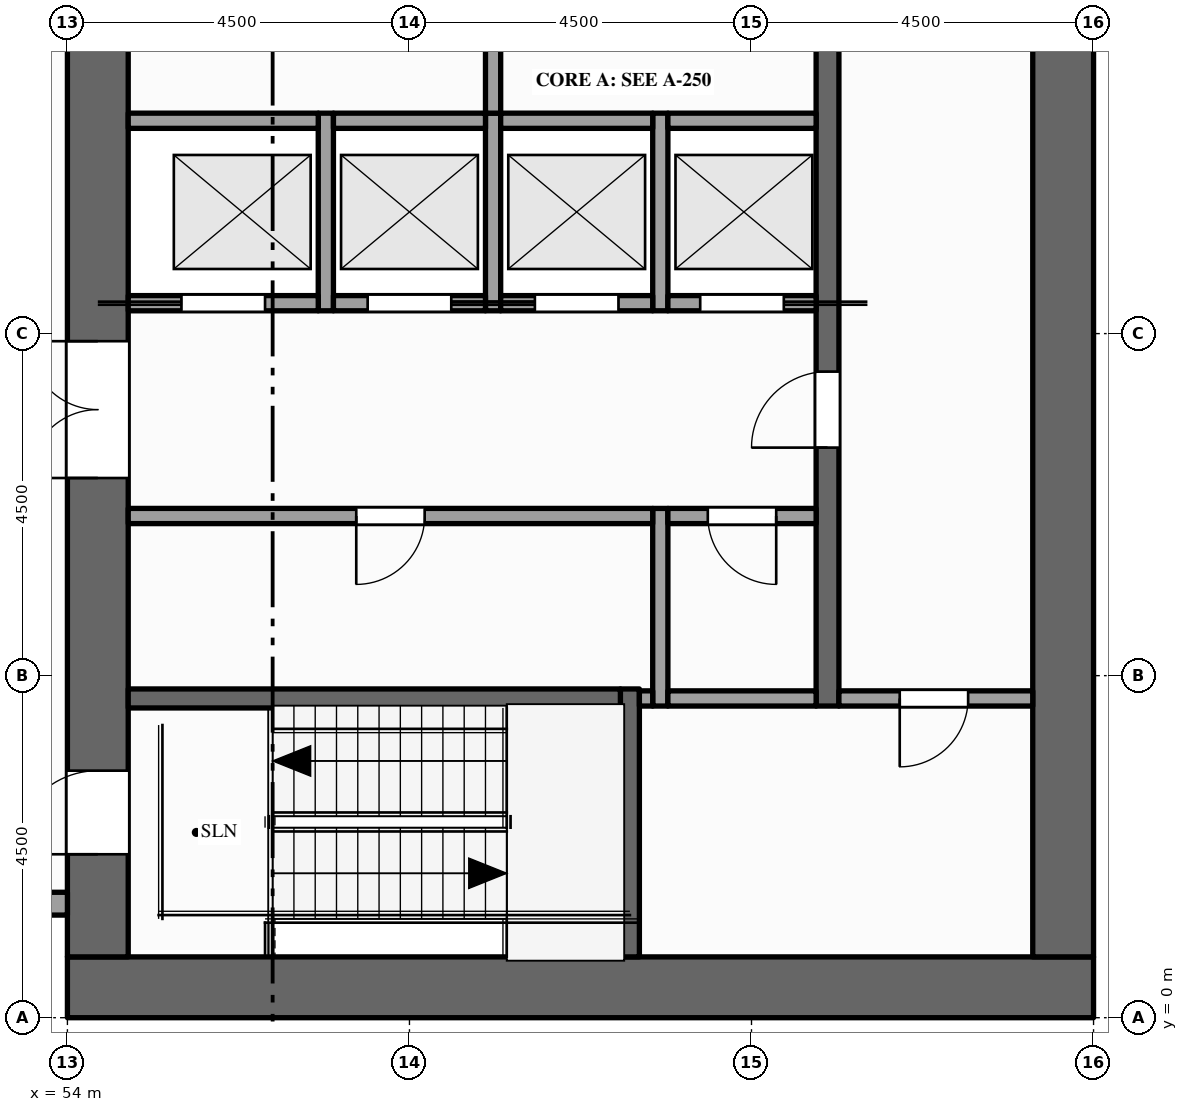
"""IFC4 building model, lengths in metres.
Left out: names, types, materials, properties, quantities, classifications, styles, units other than length and angle.
Written with IfcOpenShell. Run it as: python <this file> out.ifc"""

import sys

from ifc_helpers import new_model, si_unit, direction, frame, frame_2d, origin, place, context, subcontext, project, spatial, rectangle, extrude, element, fill, save


model = new_model("IFC4")
c1 = context("Model", 3, precision=1e-05, world=origin(), true_north=direction((0.0, 1.0)))
c2 = subcontext(c1, "Body", "Model", "MODEL_VIEW")
j1 = project(units=[si_unit("LENGTHUNIT", "METRE"), si_unit("PLANEANGLEUNIT", "RADIAN")], contexts=[c1])
p1 = place(None, origin())
s1 = spatial("IfcSite", under=j1, at=p1, CompositionType="ELEMENT")
p2 = place(p1, origin())
s2 = spatial("IfcBuilding", under=s1, at=p2, CompositionType="ELEMENT")
p3 = place(p2, frame((0.0, 0.0, 285.0)))
s3 = spatial("IfcBuildingStorey", under=s2, at=p3, CompositionType="ELEMENT", Elevation=285.0)
p4 = place(p3, frame((67.5, 0.4, -0.15), z_axis=(0.0, 0.0, 1.0), x_axis=(-1.0, 0.0, 0.0)))
e1 = element("IfcWall", 1, at=p4, inside=s3, PredefinedType="SHEAR", context=c2, shape_type="SweptSolid", body=[
    extrude(rectangle(XDim=13.5, YDim=0.8, at=frame_2d((6.75, 0.0))), origin(), (0.0, 0.0, 1.0), 4.0),
])
p5 = place(p3, frame((54.4, 0.8, -0.15), z_axis=(0.0, 0.0, 1.0), x_axis=(0.0, 1.0, 0.0)))
e2 = element("IfcWall", 2, at=p5, inside=s3, PredefinedType="SHEAR", context=c2, shape_type="SweptSolid", body=[
    extrude(rectangle(XDim=20.9, YDim=0.8, at=frame_2d((10.45, 0.0))), origin(), (0.0, 0.0, 1.0), 4.0),
])
p6 = place(p5, frame((6.3, 0.0, 0.15)))
e3 = element("IfcOpeningElement", 3, at=p6, cuts=e2, PredefinedType="OPENING", context=c2, shape_type="SweptSolid", body=[
    extrude(rectangle(XDim=1.8, YDim=2.1, at=frame_2d((0.9, 1.05))), frame((0.0, 0.41, 0.0), z_axis=(0.0, -1.0, 0.0), x_axis=(1.0, 0.0, 0.0)), (0.0, 0.0, 1.0), 0.82),
])
p7 = place(p5, frame((12.35, 0.0, 0.15)))
e4 = element("IfcOpeningElement", 4, at=p7, cuts=e2, PredefinedType="OPENING", context=c2, shape_type="SweptSolid", body=[
    extrude(rectangle(XDim=1.1, YDim=2.1, at=frame_2d((0.55, 1.05))), frame((0.0, 0.41, 0.0), z_axis=(0.0, -1.0, 0.0), x_axis=(1.0, 0.0, 0.0)), (0.0, 0.0, 1.0), 0.82),
])
p8 = place(p5, frame((1.35, 0.0, 0.15)))
e5 = element("IfcOpeningElement", 5, at=p8, cuts=e2, PredefinedType="OPENING", context=c2, shape_type="SweptSolid", body=[
    extrude(rectangle(XDim=1.1, YDim=2.1, at=frame_2d((0.55, 1.05))), frame((0.0, 0.41, 0.0), z_axis=(0.0, -1.0, 0.0), x_axis=(1.0, 0.0, 0.0)), (0.0, 0.0, 1.0), 0.82),
])
p9 = place(p5, frame((18.55, 0.0, 0.15)))
e6 = element("IfcOpeningElement", 6, at=p9, cuts=e2, PredefinedType="OPENING", context=c2, shape_type="SweptSolid", body=[
    extrude(rectangle(XDim=1.1, YDim=2.1, at=frame_2d((0.55, 1.05))), frame((0.0, 0.41, 0.0), z_axis=(0.0, -1.0, 0.0), x_axis=(1.0, 0.0, 0.0)), (0.0, 0.0, 1.0), 0.82),
])
p10 = place(p3, frame((67.1, 0.8, -0.15), z_axis=(0.0, 0.0, 1.0), x_axis=(0.0, 1.0, 0.0)))
e7 = element("IfcWall", 7, at=p10, inside=s3, PredefinedType="SHEAR", context=c2, shape_type="SweptSolid", body=[
    extrude(rectangle(XDim=20.9, YDim=0.8, at=frame_2d((10.45, 0.0))), origin(), (0.0, 0.0, 1.0), 4.0),
])
p11 = place(p3, frame((49.825, 1.5, 0.0), z_axis=(0.0, 0.0, 1.0), x_axis=(1.0, 0.0, 0.0)))
e8 = element("IfcWall", 8, at=p11, inside=s3, PredefinedType="STANDARD", context=c2, shape_type="SweptSolid", body=[
    extrude(rectangle(XDim=4.175, YDim=0.3, at=frame_2d((2.087, 0.0))), origin(), (0.0, 0.0, 1.0), 2.87),
])
p12 = place(p11, frame((0.413, 0.0, 0.9)))
e9 = element("IfcOpeningElement", 9, at=p12, cuts=e8, PredefinedType="OPENING", context=c2, shape_type="SweptSolid", body=[
    extrude(rectangle(XDim=1.2, YDim=1.75, at=frame_2d((0.6, 0.875))), frame((0.0, 0.16, 0.0), z_axis=(0.0, -1.0, 0.0), x_axis=(1.0, 0.0, 0.0)), (0.0, 0.0, 1.0), 0.32),
])
p13 = place(p11, frame((2.225, 0.0, 0.9)))
e10 = element("IfcOpeningElement", 10, at=p13, cuts=e8, PredefinedType="OPENING", context=c2, shape_type="SweptSolid", body=[
    extrude(rectangle(XDim=1.55, YDim=1.75, at=frame_2d((0.775, 0.875))), frame((0.0, 0.16, 0.0), z_axis=(0.0, -1.0, 0.0), x_axis=(1.0, 0.0, 0.0)), (0.0, 0.0, 1.0), 0.32),
])
for number, where, z_axis, x_axis in (
    (11, (57.4, 9.3, 0.0), (0.0, 0.0, 1.0), (0.0, 1.0, 0.0)),
    (12, (59.6, 9.3, 0.0), (0.0, 0.0, 1.0), (0.0, 1.0, 0.0)),
):
    element("IfcWall", number, at=place(p3, frame(where, z_axis=z_axis, x_axis=x_axis)), inside=s3, PredefinedType="SOLIDWALL", context=c2, shape_type="SweptSolid", body=[
        extrude(rectangle(XDim=2.6, YDim=0.2, at=frame_2d((1.3, 0.0))), origin(), (0.0, 0.0, 1.0), 3.85),
    ])
p14 = place(p3, frame((59.6, 11.9, 0.0), z_axis=(0.0, 0.0, 1.0), x_axis=(0.0, 1.0, 0.0)))
e13 = element("IfcWall", 13, at=p14, inside=s3, PredefinedType="PARTITIONING", context=c2, shape_type="SweptSolid", body=[
    extrude(rectangle(XDim=3.6, YDim=0.2, at=frame_2d((1.8, 0.0))), origin(), (0.0, 0.0, 1.0), 3.85),
])
p15 = place(p14, frame((1.3, 0.0, 0.0)))
e14 = element("IfcOpeningElement", 14, at=p15, cuts=e13, PredefinedType="OPENING", context=c2, shape_type="SweptSolid", body=[
    extrude(rectangle(XDim=1.0, YDim=2.1, at=frame_2d((0.5, 1.05))), frame((0.0, 0.11, 0.0), z_axis=(0.0, -1.0, 0.0), x_axis=(1.0, 0.0, 0.0)), (0.0, 0.0, 1.0), 0.22),
])
p16 = place(p3, frame((61.4, 0.8, 0.0), z_axis=(0.0, 0.0, 1.0), x_axis=(0.0, 1.0, 0.0)))
e15 = element("IfcWall", 15, at=p16, inside=s3, PredefinedType="SHEAR", context=c2, shape_type="SweptSolid", body=[
    extrude(rectangle(XDim=3.525, YDim=0.25, at=frame_2d((1.762, 0.0))), origin(), (0.0, 0.0, 1.0), 3.85),
])
p17 = place(p3, frame((61.8, 4.1, 0.0), z_axis=(0.0, 0.0, 1.0), x_axis=(0.0, 1.0, 0.0)))
e16 = element("IfcWall", 16, at=p17, inside=s3, PredefinedType="PARTITIONING", context=c2, shape_type="SweptSolid", body=[
    extrude(rectangle(XDim=2.6, YDim=0.2, at=frame_2d((1.3, 0.0))), origin(), (0.0, 0.0, 1.0), 3.85),
])
p18 = place(p3, frame((61.8, 9.3, 0.0), z_axis=(0.0, 0.0, 1.0), x_axis=(0.0, 1.0, 0.0)))
e17 = element("IfcWall", 17, at=p18, inside=s3, PredefinedType="SOLIDWALL", context=c2, shape_type="SweptSolid", body=[
    extrude(rectangle(XDim=2.6, YDim=0.2, at=frame_2d((1.3, 0.0))), origin(), (0.0, 0.0, 1.0), 3.85),
])
p19 = place(p3, frame((64.0, 4.1, 0.0), z_axis=(0.0, 0.0, 1.0), x_axis=(0.0, 1.0, 0.0)))
e18 = element("IfcWall", 18, at=p19, inside=s3, PredefinedType="SHEAR", context=c2, shape_type="SweptSolid", body=[
    extrude(rectangle(XDim=14.5, YDim=0.3, at=frame_2d((7.25, 0.0))), origin(), (0.0, 0.0, 1.0), 3.85),
])
p20 = place(p19, frame((3.4, 0.0, 0.0)))
e19 = element("IfcOpeningElement", 19, at=p20, cuts=e18, PredefinedType="OPENING", context=c2, shape_type="SweptSolid", body=[
    extrude(rectangle(XDim=1.0, YDim=2.1, at=frame_2d((0.5, 1.05))), frame((0.0, 0.16, 0.0), z_axis=(0.0, -1.0, 0.0), x_axis=(1.0, 0.0, 0.0)), (0.0, 0.0, 1.0), 0.32),
])
p21 = place(p19, frame((9.1, 0.0, 0.0)))
e20 = element("IfcOpeningElement", 20, at=p21, cuts=e18, PredefinedType="OPENING", context=c2, shape_type="SweptSolid", body=[
    extrude(rectangle(XDim=1.0, YDim=2.1, at=frame_2d((0.5, 1.05))), frame((0.0, 0.16, 0.0), z_axis=(0.0, -1.0, 0.0), x_axis=(1.0, 0.0, 0.0)), (0.0, 0.0, 1.0), 0.32),
])
p22 = place(p3, frame((54.8, 4.2, 0.0), z_axis=(0.0, 0.0, 1.0), x_axis=(1.0, 0.0, 0.0)))
e21 = element("IfcWall", 21, at=p22, inside=s3, PredefinedType="SHEAR", context=c2, shape_type="SweptSolid", body=[
    extrude(rectangle(XDim=6.475, YDim=0.25, at=frame_2d((3.237, 0.0))), origin(), (0.0, 0.0, 1.0), 3.85),
])
p23 = place(p3, frame((61.525, 4.2, 0.0), z_axis=(0.0, 0.0, 1.0), x_axis=(1.0, 0.0, 0.0)))
e22 = element("IfcWall", 22, at=p23, inside=s3, PredefinedType="PARTITIONING", context=c2, shape_type="SweptSolid", body=[
    extrude(rectangle(XDim=0.175, YDim=0.2, at=frame_2d((0.087, 0.0))), origin(), (0.0, 0.0, 1.0), 3.85),
])
p24 = place(p3, frame((61.9, 4.2, 0.0), z_axis=(0.0, 0.0, 1.0), x_axis=(1.0, 0.0, 0.0)))
e23 = element("IfcWall", 23, at=p24, inside=s3, PredefinedType="PARTITIONING", context=c2, shape_type="SweptSolid", body=[
    extrude(rectangle(XDim=1.95, YDim=0.2, at=frame_2d((0.975, 0.0))), origin(), (0.0, 0.0, 1.0), 3.85),
])
p25 = place(p3, frame((64.15, 4.2, 0.0), z_axis=(0.0, 0.0, 1.0), x_axis=(1.0, 0.0, 0.0)))
e24 = element("IfcWall", 24, at=p25, inside=s3, PredefinedType="PARTITIONING", context=c2, shape_type="SweptSolid", body=[
    extrude(rectangle(XDim=2.55, YDim=0.2, at=frame_2d((1.275, 0.0))), origin(), (0.0, 0.0, 1.0), 3.85),
])
p26 = place(p25, frame((0.8, 0.0, 0.0)))
e25 = element("IfcOpeningElement", 25, at=p26, cuts=e24, PredefinedType="OPENING", context=c2, shape_type="SweptSolid", body=[
    extrude(rectangle(XDim=0.9, YDim=2.1, at=frame_2d((0.45, 1.05))), frame((0.0, 0.11, 0.0), z_axis=(0.0, -1.0, 0.0), x_axis=(1.0, 0.0, 0.0)), (0.0, 0.0, 1.0), 0.22),
])
p27 = place(p3, frame((54.8, 6.6, 0.0), z_axis=(0.0, 0.0, 1.0), x_axis=(1.0, 0.0, 0.0)))
e26 = element("IfcWall", 26, at=p27, inside=s3, PredefinedType="PARTITIONING", context=c2, shape_type="SweptSolid", body=[
    extrude(rectangle(XDim=6.9, YDim=0.2, at=frame_2d((3.45, 0.0))), origin(), (0.0, 0.0, 1.0), 3.85),
])
p28 = place(p27, frame((3.0, 0.0, 0.0)))
e27 = element("IfcOpeningElement", 27, at=p28, cuts=e26, PredefinedType="OPENING", context=c2, shape_type="SweptSolid", body=[
    extrude(rectangle(XDim=0.9, YDim=2.1, at=frame_2d((0.45, 1.05))), frame((0.0, 0.11, 0.0), z_axis=(0.0, -1.0, 0.0), x_axis=(1.0, 0.0, 0.0)), (0.0, 0.0, 1.0), 0.22),
])
p29 = place(p3, frame((61.9, 6.6, 0.0), z_axis=(0.0, 0.0, 1.0), x_axis=(1.0, 0.0, 0.0)))
e28 = element("IfcWall", 28, at=p29, inside=s3, PredefinedType="PARTITIONING", context=c2, shape_type="SweptSolid", body=[
    extrude(rectangle(XDim=1.95, YDim=0.2, at=frame_2d((0.975, 0.0))), origin(), (0.0, 0.0, 1.0), 3.85),
])
p30 = place(p29, frame((0.525, 0.0, 0.0)))
e29 = element("IfcOpeningElement", 29, at=p30, cuts=e28, PredefinedType="OPENING", context=c2, shape_type="SweptSolid", body=[
    extrude(rectangle(XDim=0.9, YDim=2.1, at=frame_2d((0.45, 1.05))), frame((0.0, 0.11, 0.0), z_axis=(0.0, -1.0, 0.0), x_axis=(1.0, 0.0, 0.0)), (0.0, 0.0, 1.0), 0.22),
])
p31 = place(p3, frame((54.8, 9.4, 0.0), z_axis=(0.0, 0.0, 1.0), x_axis=(1.0, 0.0, 0.0)))
e30 = element("IfcWall", 30, at=p31, inside=s3, PredefinedType="SOLIDWALL", context=c2, shape_type="SweptSolid", body=[
    extrude(rectangle(XDim=2.5, YDim=0.2, at=frame_2d((1.25, 0.0))), origin(), (0.0, 0.0, 1.0), 3.85),
])
p32 = place(p31, frame((0.7, 0.0, 0.012)))
e31 = element("IfcOpeningElement", 31, at=p32, cuts=e30, PredefinedType="OPENING", context=c2, shape_type="SweptSolid", body=[
    extrude(rectangle(XDim=1.1, YDim=2.1, at=frame_2d((0.55, 1.05))), frame((0.0, 0.11, 0.0), z_axis=(0.0, -1.0, 0.0), x_axis=(1.0, 0.0, 0.0)), (0.0, 0.0, 1.0), 0.22),
])
p33 = place(p3, frame((57.5, 9.4, 0.0), z_axis=(0.0, 0.0, 1.0), x_axis=(1.0, 0.0, 0.0)))
e32 = element("IfcWall", 32, at=p33, inside=s3, PredefinedType="SOLIDWALL", context=c2, shape_type="SweptSolid", body=[
    extrude(rectangle(XDim=2.0, YDim=0.2, at=frame_2d((1.0, 0.0))), origin(), (0.0, 0.0, 1.0), 3.85),
])
p34 = place(p33, frame((0.45, 0.0, 0.012)))
e33 = element("IfcOpeningElement", 33, at=p34, cuts=e32, PredefinedType="OPENING", context=c2, shape_type="SweptSolid", body=[
    extrude(rectangle(XDim=1.1, YDim=2.1, at=frame_2d((0.55, 1.05))), frame((0.0, 0.11, 0.0), z_axis=(0.0, -1.0, 0.0), x_axis=(1.0, 0.0, 0.0)), (0.0, 0.0, 1.0), 0.22),
])
p35 = place(p3, frame((59.7, 9.4, 0.0), z_axis=(0.0, 0.0, 1.0), x_axis=(1.0, 0.0, 0.0)))
e34 = element("IfcWall", 34, at=p35, inside=s3, PredefinedType="SOLIDWALL", context=c2, shape_type="SweptSolid", body=[
    extrude(rectangle(XDim=2.0, YDim=0.2, at=frame_2d((1.0, 0.0))), origin(), (0.0, 0.0, 1.0), 3.85),
])
p36 = place(p35, frame((0.45, 0.0, 0.012)))
e35 = element("IfcOpeningElement", 35, at=p36, cuts=e34, PredefinedType="OPENING", context=c2, shape_type="SweptSolid", body=[
    extrude(rectangle(XDim=1.1, YDim=2.1, at=frame_2d((0.55, 1.05))), frame((0.0, 0.11, 0.0), z_axis=(0.0, -1.0, 0.0), x_axis=(1.0, 0.0, 0.0)), (0.0, 0.0, 1.0), 0.22),
])
p37 = place(p3, frame((61.9, 9.4, 0.0), z_axis=(0.0, 0.0, 1.0), x_axis=(1.0, 0.0, 0.0)))
e36 = element("IfcWall", 36, at=p37, inside=s3, PredefinedType="SOLIDWALL", context=c2, shape_type="SweptSolid", body=[
    extrude(rectangle(XDim=1.95, YDim=0.2, at=frame_2d((0.975, 0.0))), origin(), (0.0, 0.0, 1.0), 3.85),
])
p38 = place(p37, frame((0.425, 0.0, 0.012)))
e37 = element("IfcOpeningElement", 37, at=p38, cuts=e36, PredefinedType="OPENING", context=c2, shape_type="SweptSolid", body=[
    extrude(rectangle(XDim=1.1, YDim=2.1, at=frame_2d((0.55, 1.05))), frame((0.0, 0.11, 0.0), z_axis=(0.0, -1.0, 0.0), x_axis=(1.0, 0.0, 0.0)), (0.0, 0.0, 1.0), 0.22),
])
p39 = place(p3, frame((54.8, 11.8, 0.0), z_axis=(0.0, 0.0, 1.0), x_axis=(1.0, 0.0, 0.0)))
e38 = element("IfcWall", 38, at=p39, inside=s3, PredefinedType="SOLIDWALL", context=c2, shape_type="SweptSolid", body=[
    extrude(rectangle(XDim=2.5, YDim=0.2, at=frame_2d((1.25, 0.0))), origin(), (0.0, 0.0, 1.0), 3.85),
])
for number, where, z_axis, x_axis in (
    (39, (57.5, 11.8, 0.0), (0.0, 0.0, 1.0), (1.0, 0.0, 0.0)),
    (40, (59.7, 11.8, 0.0), (0.0, 0.0, 1.0), (1.0, 0.0, 0.0)),
):
    element("IfcWall", number, at=place(p3, frame(where, z_axis=z_axis, x_axis=x_axis)), inside=s3, PredefinedType="SOLIDWALL", context=c2, shape_type="SweptSolid", body=[
        extrude(rectangle(XDim=2.0, YDim=0.2, at=frame_2d((1.0, 0.0))), origin(), (0.0, 0.0, 1.0), 3.85),
    ])
p40 = place(p3, frame((61.9, 11.8, 0.0), z_axis=(0.0, 0.0, 1.0), x_axis=(1.0, 0.0, 0.0)))
e41 = element("IfcWall", 41, at=p40, inside=s3, PredefinedType="SOLIDWALL", context=c2, shape_type="SweptSolid", body=[
    extrude(rectangle(XDim=1.95, YDim=0.2, at=frame_2d((0.975, 0.0))), origin(), (0.0, 0.0, 1.0), 3.85),
])
p41 = place(p32, origin())
e42 = element("IfcDoor", 42, at=p41, inside=s3, OperationType="SLIDING_TO_LEFT", PredefinedType="DOOR", context=c2, shape_type="SweptSolid", body=[
    extrude(rectangle(XDim=1.1, YDim=2.1, at=frame_2d((0.55, 1.05))), frame((0.0, 0.025, 0.0), z_axis=(0.0, -1.0, 0.0), x_axis=(1.0, 0.0, 0.0)), (0.0, 0.0, 1.0), 0.05),
])
fill(e31, e42)
p42 = place(p34, origin())
e43 = element("IfcDoor", 43, at=p42, inside=s3, OperationType="SLIDING_TO_RIGHT", PredefinedType="DOOR", context=c2, shape_type="SweptSolid", body=[
    extrude(rectangle(XDim=1.1, YDim=2.1, at=frame_2d((0.55, 1.05))), frame((0.0, 0.025, 0.0), z_axis=(0.0, -1.0, 0.0), x_axis=(1.0, 0.0, 0.0)), (0.0, 0.0, 1.0), 0.05),
])
fill(e33, e43)
p43 = place(p36, origin())
e44 = element("IfcDoor", 44, at=p43, inside=s3, OperationType="SLIDING_TO_LEFT", PredefinedType="DOOR", context=c2, shape_type="SweptSolid", body=[
    extrude(rectangle(XDim=1.1, YDim=2.1, at=frame_2d((0.55, 1.05))), frame((0.0, 0.025, 0.0), z_axis=(0.0, -1.0, 0.0), x_axis=(1.0, 0.0, 0.0)), (0.0, 0.0, 1.0), 0.05),
])
fill(e35, e44)
p44 = place(p38, origin())
e45 = element("IfcDoor", 45, at=p44, inside=s3, OperationType="SLIDING_TO_RIGHT", PredefinedType="DOOR", context=c2, shape_type="SweptSolid", body=[
    extrude(rectangle(XDim=1.1, YDim=2.1, at=frame_2d((0.55, 1.05))), frame((0.0, 0.025, 0.0), z_axis=(0.0, -1.0, 0.0), x_axis=(1.0, 0.0, 0.0)), (0.0, 0.0, 1.0), 0.05),
])
fill(e37, e45)
p45 = place(p6, origin())
e46 = element("IfcDoor", 46, at=p45, inside=s3, OperationType="DOUBLE_DOOR_SINGLE_SWING", PredefinedType="DOOR", context=c2, shape_type="SweptSolid", body=[
    extrude(rectangle(XDim=1.8, YDim=2.1, at=frame_2d((0.9, 1.05))), frame((0.0, 0.025, 0.0), z_axis=(0.0, -1.0, 0.0), x_axis=(1.0, 0.0, 0.0)), (0.0, 0.0, 1.0), 0.05),
])
fill(e3, e46)
p46 = place(p20, origin())
e47 = element("IfcDoor", 47, at=p46, inside=s3, OperationType="SINGLE_SWING_LEFT", PredefinedType="DOOR", context=c2, shape_type="SweptSolid", body=[
    extrude(rectangle(XDim=1.0, YDim=2.1, at=frame_2d((0.5, 1.05))), frame((0.0, 0.025, 0.0), z_axis=(0.0, -1.0, 0.0), x_axis=(1.0, 0.0, 0.0)), (0.0, 0.0, 1.0), 0.05),
])
fill(e19, e47)
p47 = place(p8, origin())
e48 = element("IfcDoor", 48, at=p47, inside=s3, OperationType="SINGLE_SWING_LEFT", PredefinedType="DOOR", context=c2, shape_type="SweptSolid", body=[
    extrude(rectangle(XDim=1.1, YDim=2.1, at=frame_2d((0.55, 1.05))), frame((0.0, 0.025, 0.0), z_axis=(0.0, -1.0, 0.0), x_axis=(1.0, 0.0, 0.0)), (0.0, 0.0, 1.0), 0.05),
])
fill(e5, e48)
p48 = place(p26, origin())
e49 = element("IfcDoor", 49, at=p48, inside=s3, OperationType="SINGLE_SWING_LEFT", PredefinedType="DOOR", context=c2, shape_type="SweptSolid", body=[
    extrude(rectangle(XDim=0.9, YDim=2.1, at=frame_2d((0.45, 1.05))), frame((0.0, 0.025, 0.0), z_axis=(0.0, -1.0, 0.0), x_axis=(1.0, 0.0, 0.0)), (0.0, 0.0, 1.0), 0.05),
])
fill(e25, e49)
p49 = place(p28, origin())
e50 = element("IfcDoor", 50, at=p49, inside=s3, OperationType="SINGLE_SWING_LEFT", PredefinedType="DOOR", context=c2, shape_type="SweptSolid", body=[
    extrude(rectangle(XDim=0.9, YDim=2.1, at=frame_2d((0.45, 1.05))), frame((0.0, 0.025, 0.0), z_axis=(0.0, -1.0, 0.0), x_axis=(1.0, 0.0, 0.0)), (0.0, 0.0, 1.0), 0.05),
])
fill(e27, e50)
p50 = place(p30, origin())
e51 = element("IfcDoor", 51, at=p50, inside=s3, OperationType="SINGLE_SWING_RIGHT", PredefinedType="DOOR", context=c2, shape_type="SweptSolid", body=[
    extrude(rectangle(XDim=0.9, YDim=2.1, at=frame_2d((0.45, 1.05))), frame((0.0, 0.025, 0.0), z_axis=(0.0, -1.0, 0.0), x_axis=(1.0, 0.0, 0.0)), (0.0, 0.0, 1.0), 0.05),
])
fill(e29, e51)
save(model, sys.argv[1])
